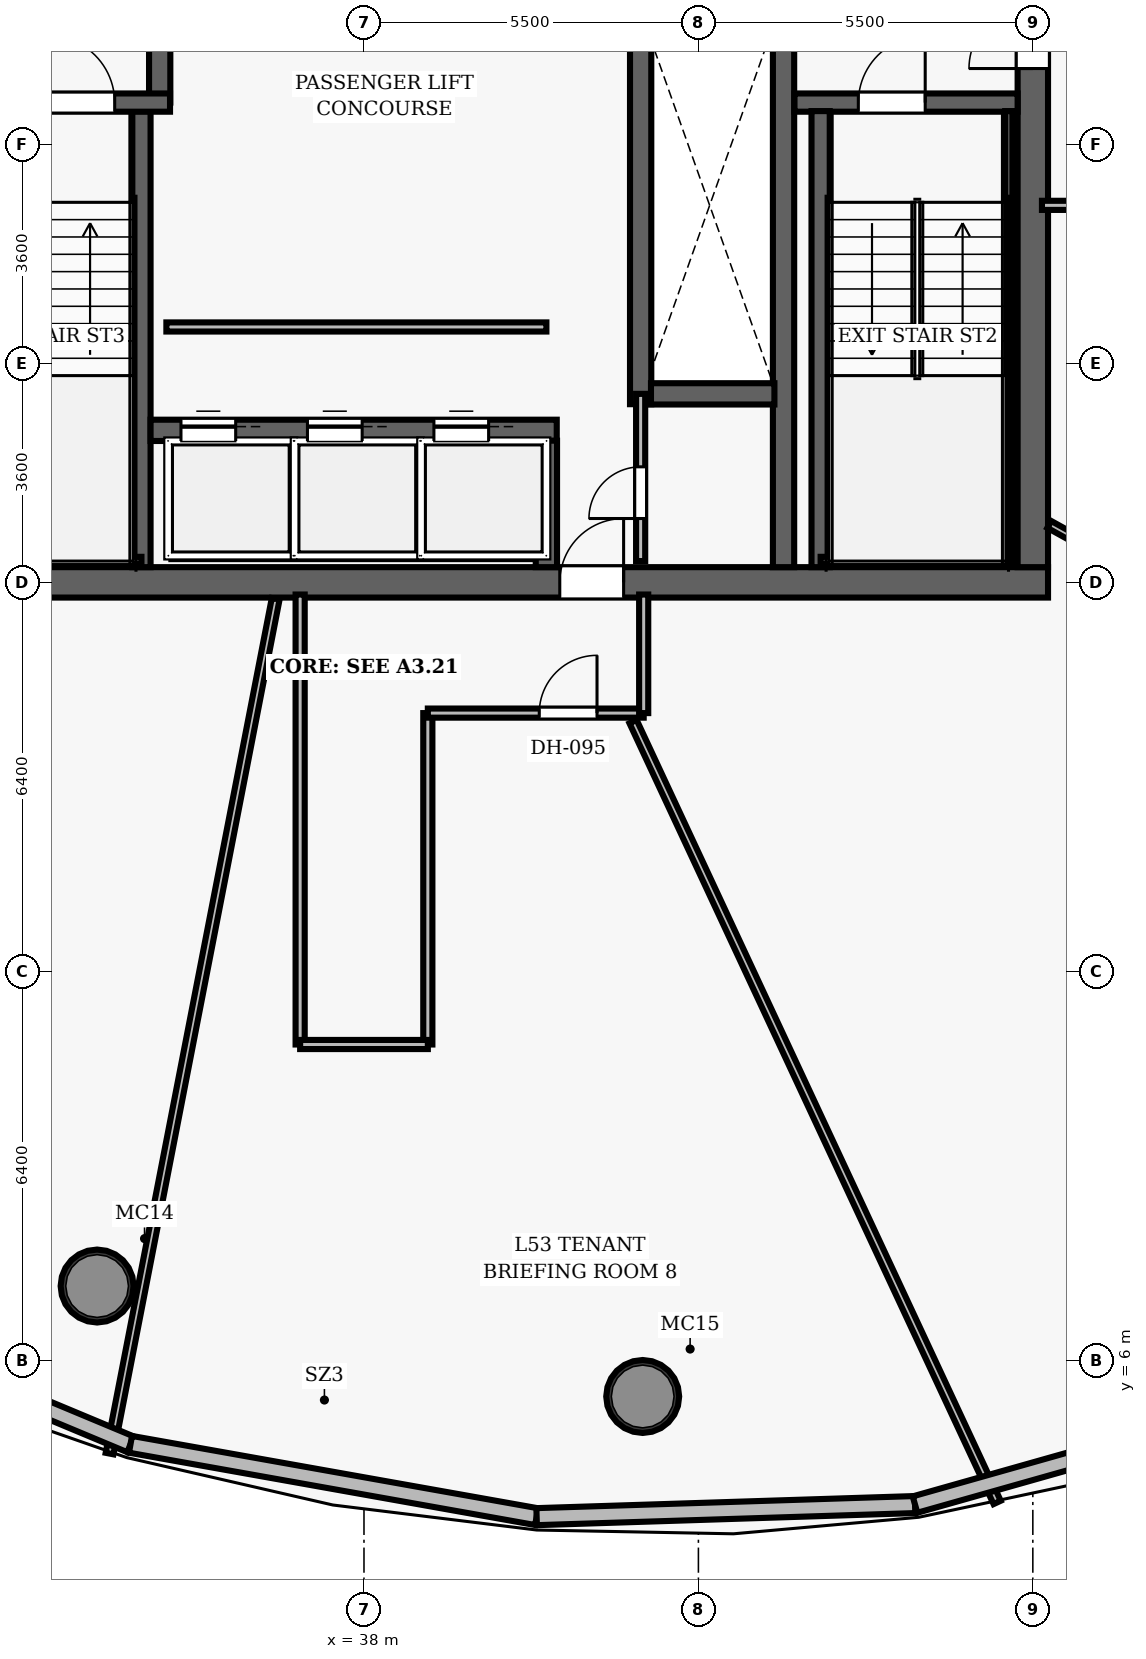
"""IFC4 building model, lengths in metres.
Left out: names, types, materials, properties, quantities, classifications, styles, units other than length and angle.
Written with IfcOpenShell. Run it as: python <this file> out.ifc"""

import sys

from ifc_helpers import new_model, si_unit, direction, frame, frame_2d, origin, origin_2d, place, context, subcontext, project, spatial, rectangle, hollow_circle, extrude, element, fill, save


model = new_model("IFC4")
c1 = context("Model", 3, precision=1e-05, world=origin(), true_north=direction((0.0, 1.0)))
c2 = subcontext(c1, "Body", "Model", "MODEL_VIEW")
j1 = project(units=[si_unit("LENGTHUNIT", "METRE"), si_unit("PLANEANGLEUNIT", "RADIAN")], contexts=[c1])
p1 = place(None, origin())
s1 = spatial("IfcSite", under=j1, at=p1, CompositionType="ELEMENT")
p2 = place(p1, origin())
s2 = spatial("IfcBuilding", under=s1, at=p2, CompositionType="ELEMENT")
p3 = place(p2, frame((0.0, 0.0, 209.7)))
s3 = spatial("IfcBuildingStorey", under=s2, at=p3, CompositionType="ELEMENT", Elevation=209.7)
p4 = place(p3, frame((26.75, 18.8, 0.0), z_axis=(0.0, 0.0, 1.0), x_axis=(1.0, 0.0, 0.0)))
e1 = element("IfcWall", 1, at=p4, inside=s3, PredefinedType="SHEAR", context=c2, shape_type="SweptSolid", body=[
    extrude(rectangle(XDim=22.5, YDim=0.5, at=frame_2d((11.25, 0.0))), origin(), (0.0, 0.0, 1.0), 3.85),
])
p5 = place(p4, frame((14.47, 0.0, 0.0)))
e2 = element("IfcOpeningElement", 2, at=p5, cuts=e1, PredefinedType="OPENING", context=c2, shape_type="SweptSolid", body=[
    extrude(rectangle(XDim=1.05, YDim=2.15, at=frame_2d((0.525, 1.075))), frame((0.0, 0.26, 0.0), z_axis=(0.0, -1.0, 0.0), x_axis=(1.0, 0.0, 0.0)), (0.0, 0.0, 1.0), 0.52),
])
p6 = place(p3, frame((49.0, 19.05, 0.0), z_axis=(0.0, 0.0, 1.0), x_axis=(0.0, 1.0, 0.0)))
e3 = element("IfcWall", 3, at=p6, inside=s3, PredefinedType="SHEAR", context=c2, shape_type="SweptSolid", body=[
    extrude(rectangle(XDim=13.9, YDim=0.5, at=frame_2d((6.95, 0.0))), origin(), (0.0, 0.0, 1.0), 3.85),
])
p7 = place(p6, frame((8.2, 0.0, 0.0)))
e4 = element("IfcOpeningElement", 4, at=p7, cuts=e3, PredefinedType="OPENING", context=c2, shape_type="SweptSolid", body=[
    extrude(rectangle(XDim=1.05, YDim=2.15, at=frame_2d((0.525, 1.075))), frame((0.0, 0.26, 0.0), z_axis=(0.0, -1.0, 0.0), x_axis=(1.0, 0.0, 0.0)), (0.0, 0.0, 1.0), 0.52),
])
p8 = place(p3, frame((44.9, 19.05, 0.0), z_axis=(0.0, 0.0, 1.0), x_axis=(0.0, 1.0, 0.0)))
e5 = element("IfcWall", 5, at=p8, inside=s3, PredefinedType="SHEAR", context=c2, shape_type="SweptSolid", body=[
    extrude(rectangle(XDim=13.9, YDim=0.35, at=frame_2d((6.95, 0.0))), origin(), (0.0, 0.0, 1.0), 3.85),
])
for number, where, z_axis, x_axis in (
    (6, (33.611, 7.228, 0.0), (0.0, 0.0, 1.0), (1.0, 0.0, 0.0)),
    (7, (42.584, 5.412, 0.0), (0.0, 0.0, 1.0), (1.0, 0.0, 0.0)),
):
    element("IfcColumn", number, at=place(p3, frame(where, z_axis=z_axis, x_axis=x_axis)), inside=s3, PredefinedType="COLUMN", context=c2, shape_type="SweptSolid", body=[
        extrude(hollow_circle(Radius=0.6, WallThickness=0.05, at=origin_2d()), origin(), (0.0, 0.0, 1.0), 3.85),
    ])
p9 = place(p3, frame((45.08, 26.69, 0.0), z_axis=(0.0, 0.0, 1.0), x_axis=(1.0, 0.0, 0.0)))
e8 = element("IfcWall", 8, at=p9, inside=s3, PredefinedType="SHEAR", context=c2, shape_type="SweptSolid", body=[
    extrude(rectangle(XDim=3.67, YDim=0.3, at=frame_2d((1.835, 0.0))), origin(), (0.0, 0.0, 1.0), 3.85),
])
p10 = place(p9, frame((1.05, 0.0, 0.0)))
e9 = element("IfcOpeningElement", 9, at=p10, cuts=e8, PredefinedType="OPENING", context=c2, shape_type="SweptSolid", body=[
    extrude(rectangle(XDim=1.1, YDim=2.15, at=frame_2d((0.55, 1.075))), frame((0.0, 0.16, 0.0), z_axis=(0.0, -1.0, 0.0), x_axis=(1.0, 0.0, 0.0)), (0.0, 0.0, 1.0), 0.32),
])
p11 = place(p3, frame((45.51, 19.05, 0.0), z_axis=(0.0, 0.0, 1.0), x_axis=(0.0, 1.0, 0.0)))
e10 = element("IfcWall", 10, at=p11, inside=s3, PredefinedType="SHEAR", context=c2, shape_type="SweptSolid", body=[
    extrude(rectangle(XDim=7.5, YDim=0.3, at=frame_2d((3.75, 0.0))), origin(), (0.0, 0.0, 1.0), 3.85),
])
p12 = place(p3, frame((48.605, 19.1, 0.0), z_axis=(0.0, 0.0, 1.0), x_axis=(0.0, 1.0, 0.0)))
e11 = element("IfcWall", 11, at=p12, inside=s3, PredefinedType="SHEAR", context=c2, shape_type="SweptSolid", body=[
    extrude(rectangle(XDim=7.45, YDim=0.12, at=frame_2d((3.725, 0.0))), origin(), (0.0, 0.0, 1.0), 3.85),
])
p13 = place(p3, frame((45.51, 19.16, 0.0), z_axis=(0.0, 0.0, 1.0), x_axis=(1.0, 0.0, 0.0)))
e12 = element("IfcWall", 12, at=p13, inside=s3, PredefinedType="SHEAR", context=c2, shape_type="SweptSolid", body=[
    extrude(rectangle(XDim=3.095, YDim=0.12, at=frame_2d((1.547, 0.0))), origin(), (0.0, 0.0, 1.0), 3.85),
])
p14 = place(p3, frame((34.34, 19.05, 0.0), z_axis=(0.0, 0.0, 1.0), x_axis=(0.0, 1.0, 0.0)))
e13 = element("IfcWall", 13, at=p14, inside=s3, PredefinedType="SHEAR", context=c2, shape_type="SweptSolid", body=[
    extrude(rectangle(XDim=7.5, YDim=0.3, at=frame_2d((3.75, 0.0))), origin(), (0.0, 0.0, 1.0), 3.85),
])
p15 = place(p3, frame((34.64, 26.69, 0.0), z_axis=(0.0, 0.0, 1.0), x_axis=(0.0, 1.0, 0.0)))
e14 = element("IfcWall", 14, at=p15, inside=s3, PredefinedType="SHEAR", context=c2, shape_type="SweptSolid", body=[
    extrude(rectangle(XDim=6.26, YDim=0.35, at=frame_2d((3.13, 0.0))), origin(), (0.0, 0.0, 1.0), 3.85),
])
p16 = place(p3, frame((31.25, 26.69, 0.0), z_axis=(0.0, 0.0, 1.0), x_axis=(1.0, 0.0, 0.0)))
e15 = element("IfcWall", 15, at=p16, inside=s3, PredefinedType="SHEAR", context=c2, shape_type="SweptSolid", body=[
    extrude(rectangle(XDim=3.56, YDim=0.3, at=frame_2d((1.78, 0.0))), origin(), (0.0, 0.0, 1.0), 3.85),
])
p17 = place(p16, frame((1.55, 0.0, 0.0)))
e16 = element("IfcOpeningElement", 16, at=p17, cuts=e15, PredefinedType="OPENING", context=c2, shape_type="SweptSolid", body=[
    extrude(rectangle(XDim=1.1, YDim=2.15, at=frame_2d((0.55, 1.075))), frame((0.0, 0.16, 0.0), z_axis=(0.0, -1.0, 0.0), x_axis=(1.0, 0.0, 0.0)), (0.0, 0.0, 1.0), 0.32),
])
p18 = place(p3, frame((31.3, 19.16, 0.0), z_axis=(0.0, 0.0, 1.0), x_axis=(1.0, 0.0, 0.0)))
e17 = element("IfcWall", 17, at=p18, inside=s3, PredefinedType="SHEAR", context=c2, shape_type="SweptSolid", body=[
    extrude(rectangle(XDim=3.04, YDim=0.12, at=frame_2d((1.52, 0.0))), origin(), (0.0, 0.0, 1.0), 3.85),
])
p19 = place(p3, frame((42.55, 21.73, 0.0), z_axis=(0.0, 0.0, 1.0), x_axis=(0.0, 1.0, 0.0)))
e18 = element("IfcWall", 18, at=p19, inside=s3, PredefinedType="SHEAR", context=c2, shape_type="SweptSolid", body=[
    extrude(rectangle(XDim=6.54, YDim=0.35, at=frame_2d((3.27, 0.0))), origin(), (0.0, 0.0, 1.0), 3.035),
])
p20 = place(p3, frame((42.72, 21.9, 0.0), z_axis=(0.0, 0.0, 1.0), x_axis=(1.0, 0.0, 0.0)))
e19 = element("IfcWall", 19, at=p20, inside=s3, PredefinedType="SHEAR", context=c2, shape_type="SweptSolid", body=[
    extrude(rectangle(XDim=2.03, YDim=0.35, at=frame_2d((1.015, 0.0))), origin(), (0.0, 0.0, 1.0), 3.035),
])
p21 = place(p3, frame((34.49, 21.3, 0.0), z_axis=(0.0, 0.0, 1.0), x_axis=(1.0, 0.0, 0.0)))
e20 = element("IfcWall", 20, at=p21, inside=s3, PredefinedType="SHEAR", context=c2, shape_type="SweptSolid", body=[
    extrude(rectangle(XDim=6.68, YDim=0.35, at=frame_2d((3.34, 0.0))), origin(), (0.0, 0.0, 1.0), 3.035),
])
p22 = place(p21, frame((0.5, 0.0, 0.0)))
e21 = element("IfcOpeningElement", 21, at=p22, cuts=e20, PredefinedType="OPENING", context=c2, shape_type="SweptSolid", body=[
    extrude(rectangle(XDim=0.9, YDim=2.15, at=frame_2d((0.45, 1.075))), frame((0.0, 0.185, 0.0), z_axis=(0.0, -1.0, 0.0), x_axis=(1.0, 0.0, 0.0)), (0.0, 0.0, 1.0), 0.37),
])
p23 = place(p21, frame((2.58, 0.0, 0.0)))
e22 = element("IfcOpeningElement", 22, at=p23, cuts=e20, PredefinedType="OPENING", context=c2, shape_type="SweptSolid", body=[
    extrude(rectangle(XDim=0.9, YDim=2.15, at=frame_2d((0.45, 1.075))), frame((0.0, 0.185, 0.0), z_axis=(0.0, -1.0, 0.0), x_axis=(1.0, 0.0, 0.0)), (0.0, 0.0, 1.0), 0.37),
])
p24 = place(p21, frame((4.66, 0.0, 0.0)))
e23 = element("IfcOpeningElement", 23, at=p24, cuts=e20, PredefinedType="OPENING", context=c2, shape_type="SweptSolid", body=[
    extrude(rectangle(XDim=0.9, YDim=2.15, at=frame_2d((0.45, 1.075))), frame((0.0, 0.185, 0.0), z_axis=(0.0, -1.0, 0.0), x_axis=(1.0, 0.0, 0.0)), (0.0, 0.0, 1.0), 0.37),
])
p25 = place(p3, frame((41.0, 19.05, 0.0), z_axis=(0.0, 0.0, 1.0), x_axis=(0.0, 1.0, 0.0)))
e24 = element("IfcWall", 24, at=p25, inside=s3, PredefinedType="SHEAR", context=c2, shape_type="SweptSolid", body=[
    extrude(rectangle(XDim=2.08, YDim=0.35, at=frame_2d((1.04, 0.0))), origin(), (0.0, 0.0, 1.0), 3.035),
])
p26 = place(p3, frame((34.75, 23.0, 0.0), z_axis=(0.0, 0.0, 1.0), x_axis=(1.0, 0.0, 0.0)))
e25 = element("IfcWall", 25, at=p26, inside=s3, PredefinedType="PARTITIONING", context=c2, shape_type="SweptSolid", body=[
    extrude(rectangle(XDim=6.25, YDim=0.15, at=frame_2d((3.125, 0.0))), origin(), (0.0, 0.0, 1.0), 3.035),
])
p27 = place(p3, frame((42.55, 19.15, 0.0), z_axis=(0.0, 0.0, 1.0), x_axis=(0.0, 1.0, 0.0)))
e26 = element("IfcWall", 26, at=p27, inside=s3, PredefinedType="PARTITIONING", context=c2, shape_type="SweptSolid", body=[
    extrude(rectangle(XDim=2.75, YDim=0.15, at=frame_2d((1.375, 0.0))), origin(), (0.0, 0.0, 1.0), 3.035),
])
p28 = place(p27, frame((0.7, 0.0, 0.0)))
e27 = element("IfcOpeningElement", 27, at=p28, cuts=e26, PredefinedType="OPENING", context=c2, shape_type="SweptSolid", body=[
    extrude(rectangle(XDim=0.85, YDim=2.1, at=frame_2d((0.425, 1.05))), frame((0.0, 0.085, 0.0), z_axis=(0.0, -1.0, 0.0), x_axis=(1.0, 0.0, 0.0)), (0.0, 0.0, 1.0), 0.17),
])
p29 = place(p3, frame((49.15, 25.0, 0.0), z_axis=(0.0, 0.0, 1.0), x_axis=(1.0, 0.0, 0.0)))
e28 = element("IfcWall", 28, at=p29, inside=s3, PredefinedType="PARTITIONING", context=c2, shape_type="SweptSolid", body=[
    extrude(rectangle(XDim=8.973, YDim=0.15, at=frame_2d((4.487, 0.0))), origin(), (0.0, 0.0, 1.0), 3.035),
])
p30 = place(p29, frame((1.493, 0.0, 0.0)))
e29 = element("IfcOpeningElement", 29, at=p30, cuts=e28, PredefinedType="OPENING", context=c2, shape_type="SweptSolid", body=[
    extrude(rectangle(XDim=1.5, YDim=2.2, at=frame_2d((0.75, 1.1))), frame((0.0, 0.085, 0.0), z_axis=(0.0, -1.0, 0.0), x_axis=(1.0, 0.0, 0.0)), (0.0, 0.0, 1.0), 0.17),
])
p31 = place(p3, frame((36.95, 11.2, 0.0), z_axis=(0.0, 0.0, 1.0), x_axis=(0.0, 1.0, 0.0)))
e30 = element("IfcWall", 30, at=p31, inside=s3, PredefinedType="PARTITIONING", context=c2, shape_type="SweptSolid", body=[
    extrude(rectangle(XDim=7.4, YDim=0.15, at=frame_2d((3.7, 0.0))), origin(), (0.0, 0.0, 1.0), 3.035),
])
p32 = place(p3, frame((39.05, 11.2, 0.0), z_axis=(0.0, 0.0, 1.0), x_axis=(0.0, 1.0, 0.0)))
e31 = element("IfcWall", 31, at=p32, inside=s3, PredefinedType="PARTITIONING", context=c2, shape_type="SweptSolid", body=[
    extrude(rectangle(XDim=5.45, YDim=0.15, at=frame_2d((2.725, 0.0))), origin(), (0.0, 0.0, 1.0), 3.035),
])
p33 = place(p3, frame((39.05, 16.65, 0.0), z_axis=(0.0, 0.0, 1.0), x_axis=(1.0, 0.0, 0.0)))
e32 = element("IfcWall", 32, at=p33, inside=s3, PredefinedType="PARTITIONING", context=c2, shape_type="SweptSolid", body=[
    extrude(rectangle(XDim=3.55, YDim=0.15, at=frame_2d((1.775, 0.0))), origin(), (0.0, 0.0, 1.0), 3.035),
])
p34 = place(p33, frame((1.833, 0.0, 0.0)))
e33 = element("IfcOpeningElement", 33, at=p34, cuts=e32, PredefinedType="OPENING", context=c2, shape_type="SweptSolid", body=[
    extrude(rectangle(XDim=0.95, YDim=2.15, at=frame_2d((0.475, 1.075))), frame((0.0, 0.085, 0.0), z_axis=(0.0, -1.0, 0.0), x_axis=(1.0, 0.0, 0.0)), (0.0, 0.0, 1.0), 0.17),
])
p35 = place(p3, frame((42.6, 16.65, 0.0), z_axis=(0.0, 0.0, 1.0), x_axis=(0.0, 1.0, 0.0)))
e34 = element("IfcWall", 34, at=p35, inside=s3, PredefinedType="PARTITIONING", context=c2, shape_type="SweptSolid", body=[
    extrude(rectangle(XDim=1.95, YDim=0.15, at=frame_2d((0.975, 0.0))), origin(), (0.0, 0.0, 1.0), 3.035),
])
p36 = place(p3, frame((36.95, 11.2, 0.0), z_axis=(0.0, 0.0, 1.0), x_axis=(1.0, 0.0, 0.0)))
e35 = element("IfcWall", 35, at=p36, inside=s3, PredefinedType="PARTITIONING", context=c2, shape_type="SweptSolid", body=[
    extrude(rectangle(XDim=2.1, YDim=0.15, at=frame_2d((1.05, 0.0))), origin(), (0.0, 0.0, 1.0), 3.035),
])
p37 = place(p3, frame((36.548, 18.53, 0.0), z_axis=(0.0, 0.0, 1.0), x_axis=(-0.190821746149, -0.981624704863, 0.0)))
e36 = element("IfcWall", 36, at=p37, inside=s3, PredefinedType="PARTITIONING", context=c2, shape_type="SweptSolid", body=[
    extrude(rectangle(XDim=14.321, YDim=0.13, at=frame_2d((7.16, 0.0))), origin(), (0.0, 0.0, 1.0), 3.035),
])
p38 = place(p3, frame((42.425, 16.51, 0.0), z_axis=(0.0, 0.0, 1.0), x_axis=(0.422619428182, -0.906307243115, 0.0)))
e37 = element("IfcWall", 37, at=p38, inside=s3, PredefinedType="PARTITIONING", context=c2, shape_type="SweptSolid", body=[
    extrude(rectangle(XDim=14.168, YDim=0.13, at=frame_2d((7.084, 0.0))), origin(), (0.0, 0.0, 1.0), 3.035),
])
p39 = place(p3, frame((49.27, 19.753, 0.0), z_axis=(0.0, 0.0, 1.0), x_axis=(0.874615259577, -0.484817643775, 0.0)))
e38 = element("IfcWall", 38, at=p39, inside=s3, PredefinedType="PARTITIONING", context=c2, shape_type="SweptSolid", body=[
    extrude(rectangle(XDim=12.235, YDim=0.13, at=frame_2d((6.118, 0.0))), origin(), (0.0, 0.0, 1.0), 3.035),
])
p40 = place(p3, frame((34.16, 4.625, 0.0), z_axis=(0.0, 0.0, 1.0), x_axis=(-0.922805990823, 0.385264978035, 0.0)))
e39 = element("IfcWall", 39, at=p40, inside=s3, PredefinedType="SOLIDWALL", context=c2, shape_type="SweptSolid", body=[
    extrude(rectangle(XDim=7.018, YDim=0.28, at=frame_2d((3.509, 0.0))), origin(), (0.0, 0.0, 1.0), 3.62),
])
p41 = place(p3, frame((40.839, 3.436, 0.0), z_axis=(0.0, 0.0, 1.0), x_axis=(-0.984511753374, 0.175318588488, 0.0)))
e40 = element("IfcWall", 40, at=p41, inside=s3, PredefinedType="SOLIDWALL", context=c2, shape_type="SweptSolid", body=[
    extrude(rectangle(XDim=6.784, YDim=0.28, at=frame_2d((3.392, 0.0))), origin(), (0.0, 0.0, 1.0), 3.62),
])
p42 = place(p3, frame((47.062, 3.634, 0.0), z_axis=(0.0, 0.0, 1.0), x_axis=(-0.999490496546, -0.031917821271, 0.0)))
e41 = element("IfcWall", 41, at=p42, inside=s3, PredefinedType="SOLIDWALL", context=c2, shape_type="SweptSolid", body=[
    extrude(rectangle(XDim=6.226, YDim=0.28, at=frame_2d((3.113, 0.0))), origin(), (0.0, 0.0, 1.0), 3.62),
])
p43 = place(p3, frame((52.321, 5.122, 0.0), z_axis=(0.0, 0.0, 1.0), x_axis=(-0.962248884764, -0.272171056086, 0.0)))
e42 = element("IfcWall", 42, at=p43, inside=s3, PredefinedType="SOLIDWALL", context=c2, shape_type="SweptSolid", body=[
    extrude(rectangle(XDim=5.465, YDim=0.28, at=frame_2d((2.732, 0.0))), origin(), (0.0, 0.0, 1.0), 3.62),
])
p44 = place(p10, origin())
e43 = element("IfcDoor", 43, at=p44, inside=s3, OperationType="SINGLE_SWING_RIGHT", PredefinedType="DOOR", context=c2, shape_type="SweptSolid", body=[
    extrude(rectangle(XDim=1.1, YDim=2.15, at=frame_2d((0.55, 1.075))), frame((0.0, 0.025, 0.0), z_axis=(0.0, -1.0, 0.0), x_axis=(1.0, 0.0, 0.0)), (0.0, 0.0, 1.0), 0.05),
])
fill(e9, e43)
p45 = place(p7, origin())
e44 = element("IfcDoor", 44, at=p45, inside=s3, OperationType="SINGLE_SWING_LEFT", PredefinedType="DOOR", context=c2, shape_type="SweptSolid", body=[
    extrude(rectangle(XDim=1.05, YDim=2.15, at=frame_2d((0.525, 1.075))), frame((0.0, 0.025, 0.0), z_axis=(0.0, -1.0, 0.0), x_axis=(1.0, 0.0, 0.0)), (0.0, 0.0, 1.0), 0.05),
])
fill(e4, e44)
p46 = place(p17, origin())
e45 = element("IfcDoor", 45, at=p46, inside=s3, OperationType="SINGLE_SWING_LEFT", PredefinedType="DOOR", context=c2, shape_type="SweptSolid", body=[
    extrude(rectangle(XDim=1.1, YDim=2.15, at=frame_2d((0.55, 1.075))), frame((0.0, 0.025, 0.0), z_axis=(0.0, -1.0, 0.0), x_axis=(1.0, 0.0, 0.0)), (0.0, 0.0, 1.0), 0.05),
])
fill(e16, e45)
p47 = place(p5, origin())
e46 = element("IfcDoor", 46, at=p47, inside=s3, OperationType="SINGLE_SWING_RIGHT", PredefinedType="DOOR", context=c2, shape_type="SweptSolid", body=[
    extrude(rectangle(XDim=1.05, YDim=2.15, at=frame_2d((0.525, 1.075))), frame((0.0, 0.025, 0.0), z_axis=(0.0, -1.0, 0.0), x_axis=(1.0, 0.0, 0.0)), (0.0, 0.0, 1.0), 0.05),
])
fill(e2, e46)
p48 = place(p28, origin())
e47 = element("IfcDoor", 47, at=p48, inside=s3, OperationType="SINGLE_SWING_LEFT", PredefinedType="DOOR", context=c2, shape_type="SweptSolid", body=[
    extrude(rectangle(XDim=0.85, YDim=2.1, at=frame_2d((0.425, 1.05))), frame((0.0, 0.025, 0.0), z_axis=(0.0, -1.0, 0.0), x_axis=(1.0, 0.0, 0.0)), (0.0, 0.0, 1.0), 0.05),
])
fill(e27, e47)
p49 = place(p34, origin())
e48 = element("IfcDoor", 48, at=p49, inside=s3, OperationType="SINGLE_SWING_RIGHT", PredefinedType="DOOR", context=c2, shape_type="SweptSolid", body=[
    extrude(rectangle(XDim=0.95, YDim=2.15, at=frame_2d((0.475, 1.075))), frame((0.0, 0.025, 0.0), z_axis=(0.0, -1.0, 0.0), x_axis=(1.0, 0.0, 0.0)), (0.0, 0.0, 1.0), 0.05),
])
fill(e33, e48)
p50 = place(p22, origin())
e49 = element("IfcDoor", 49, at=p50, inside=s3, OperationType="SLIDING_TO_LEFT", PredefinedType="DOOR", context=c2, shape_type="SweptSolid", body=[
    extrude(rectangle(XDim=0.9, YDim=2.15, at=frame_2d((0.45, 1.075))), frame((0.0, 0.025, 0.0), z_axis=(0.0, -1.0, 0.0), x_axis=(1.0, 0.0, 0.0)), (0.0, 0.0, 1.0), 0.05),
])
fill(e21, e49)
p51 = place(p23, origin())
e50 = element("IfcDoor", 50, at=p51, inside=s3, OperationType="SLIDING_TO_LEFT", PredefinedType="DOOR", context=c2, shape_type="SweptSolid", body=[
    extrude(rectangle(XDim=0.9, YDim=2.15, at=frame_2d((0.45, 1.075))), frame((0.0, 0.025, 0.0), z_axis=(0.0, -1.0, 0.0), x_axis=(1.0, 0.0, 0.0)), (0.0, 0.0, 1.0), 0.05),
])
fill(e22, e50)
p52 = place(p24, origin())
e51 = element("IfcDoor", 51, at=p52, inside=s3, OperationType="SLIDING_TO_LEFT", PredefinedType="DOOR", context=c2, shape_type="SweptSolid", body=[
    extrude(rectangle(XDim=0.9, YDim=2.15, at=frame_2d((0.45, 1.075))), frame((0.0, 0.025, 0.0), z_axis=(0.0, -1.0, 0.0), x_axis=(1.0, 0.0, 0.0)), (0.0, 0.0, 1.0), 0.05),
])
fill(e23, e51)
save(model, sys.argv[1])
